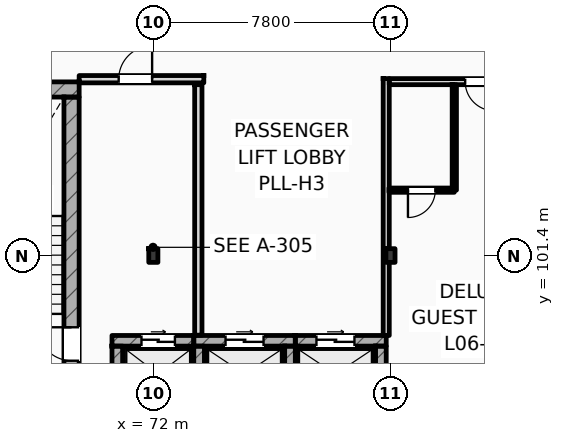
"""IFC4 building model, lengths in metres.
Left out: names, types, materials, properties, quantities, classifications, styles, units other than length and angle.
Written with IfcOpenShell. Run it as: python <this file> out.ifc"""

import sys

from ifc_helpers import new_model, si_unit, direction, frame, frame_2d, origin, origin_2d, place, context, subcontext, project, spatial, rectangle, i_section, extrude, element, fill, save


model = new_model("IFC4")
c1 = context("Model", 3, precision=1e-05, world=origin(), true_north=direction((0.0, 1.0)))
c2 = subcontext(c1, "Body", "Model", "MODEL_VIEW")
j1 = project(units=[si_unit("LENGTHUNIT", "METRE"), si_unit("PLANEANGLEUNIT", "RADIAN")], contexts=[c1])
p1 = place(None, origin())
s1 = spatial("IfcSite", under=j1, at=p1, CompositionType="ELEMENT")
p2 = place(p1, origin())
s2 = spatial("IfcBuilding", under=s1, at=p2, CompositionType="ELEMENT")
p3 = place(p2, frame((0.0, 0.0, 28.2)))
s3 = spatial("IfcBuildingStorey", under=s2, at=p3, CompositionType="ELEMENT", Elevation=28.2)
for number, where, z_axis, x_axis in (
    (1, (72.0, 101.4, 0.0), (0.0, 0.0, 1.0), (1.0, 0.0, 0.0)),
    (2, (79.8, 101.4, 0.0), (0.0, 0.0, 1.0), (1.0, 0.0, 0.0)),
):
    element("IfcColumn", number, at=place(p3, frame(where, z_axis=z_axis, x_axis=x_axis)), inside=s3, PredefinedType="COLUMN", context=c2, shape_type="SweptSolid", body=[
        extrude(i_section(OverallWidth=0.3, OverallDepth=0.45, WebThickness=0.014, FlangeThickness=0.026, FilletRadius=0.027, at=origin_2d()), origin(), (0.0, 0.0, 1.0), 3.6),
    ])
p4 = place(p3, frame((64.4, 106.862, 0.0), z_axis=(0.0, 0.0, 1.0), x_axis=(1.0, 0.0, 0.0)))
e3 = element("IfcWall", 3, at=p4, inside=s3, PredefinedType="SHEAR", context=c2, shape_type="SweptSolid", body=[
    extrude(rectangle(XDim=5.16, YDim=0.5, at=frame_2d((2.58, 0.0))), origin(), (0.0, 0.0, 1.0), 3.6),
])
p5 = place(p3, frame((69.31, 97.5, 0.0), z_axis=(0.0, 0.0, 1.0), x_axis=(0.0, 1.0, 0.0)))
e4 = element("IfcWall", 4, at=p5, inside=s3, PredefinedType="SHEAR", context=c2, shape_type="SweptSolid", body=[
    extrude(rectangle(XDim=9.112, YDim=0.5, at=frame_2d((4.556, 0.0))), origin(), (0.0, 0.0, 1.0), 3.6),
])
p6 = place(p5, frame((0.44, 0.0, 0.0)))
e5 = element("IfcOpeningElement", 5, at=p6, cuts=e4, PredefinedType="OPENING", context=c2, shape_type="SweptSolid", body=[
    extrude(rectangle(XDim=1.1, YDim=2.2, at=frame_2d((0.55, 1.1))), frame((0.0, 0.26, 0.0), z_axis=(0.0, -1.0, 0.0), x_axis=(1.0, 0.0, 0.0)), (0.0, 0.0, 1.0), 0.52),
])
p7 = place(p3, frame((70.64, 98.595, 0.0), z_axis=(0.0, 0.0, 1.0), x_axis=(1.0, 0.0, 0.0)))
e6 = element("IfcWall", 6, at=p7, inside=s3, PredefinedType="SHEAR", context=c2, shape_type="SweptSolid", body=[
    extrude(rectangle(XDim=2.69, YDim=0.35, at=frame_2d((1.345, 0.0))), origin(), (0.0, 0.0, 1.0), 3.36),
])
p8 = place(p7, frame((0.97, 0.0, 0.0)))
e7 = element("IfcOpeningElement", 7, at=p8, cuts=e6, PredefinedType="OPENING", context=c2, shape_type="SweptSolid", body=[
    extrude(rectangle(XDim=1.1, YDim=2.2, at=frame_2d((0.55, 1.1))), frame((0.0, 0.185, 0.0), z_axis=(0.0, -1.0, 0.0), x_axis=(1.0, 0.0, 0.0)), (0.0, 0.0, 1.0), 0.37),
])
p9 = place(p3, frame((70.815, 96.58, 0.0), z_axis=(0.0, 0.0, 1.0), x_axis=(0.0, 1.0, 0.0)))
e8 = element("IfcWall", 8, at=p9, inside=s3, PredefinedType="SHEAR", context=c2, shape_type="SweptSolid", body=[
    extrude(rectangle(XDim=1.84, YDim=0.35, at=frame_2d((0.92, 0.0))), origin(), (0.0, 0.0, 1.0), 3.36),
])
p10 = place(p3, frame((73.33, 98.595, 0.0), z_axis=(0.0, 0.0, 1.0), x_axis=(1.0, 0.0, 0.0)))
e9 = element("IfcWall", 9, at=p10, inside=s3, PredefinedType="SHEAR", context=c2, shape_type="SweptSolid", body=[
    extrude(rectangle(XDim=3.34, YDim=0.35, at=frame_2d((1.67, 0.0))), origin(), (0.0, 0.0, 1.0), 3.36),
])
p11 = place(p10, frame((1.045, 0.0, 0.0)))
e10 = element("IfcOpeningElement", 10, at=p11, cuts=e9, PredefinedType="OPENING", context=c2, shape_type="SweptSolid", body=[
    extrude(rectangle(XDim=1.25, YDim=2.25, at=frame_2d((0.625, 1.125))), frame((0.0, 0.185, 0.0), z_axis=(0.0, -1.0, 0.0), x_axis=(1.0, 0.0, 0.0)), (0.0, 0.0, 1.0), 0.37),
])
for number, where, z_axis, x_axis in (
    (11, (73.505, 96.58, 0.0), (0.0, 0.0, 1.0), (0.0, 1.0, 0.0)),
    (12, (76.495, 96.58, 0.0), (0.0, 0.0, 1.0), (0.0, 1.0, 0.0)),
):
    element("IfcWall", number, at=place(p3, frame(where, z_axis=z_axis, x_axis=x_axis)), inside=s3, PredefinedType="SHEAR", context=c2, shape_type="SweptSolid", body=[
        extrude(rectangle(XDim=1.84, YDim=0.35, at=frame_2d((0.92, 0.0))), origin(), (0.0, 0.0, 1.0), 3.36),
    ])
p12 = place(p3, frame((76.67, 98.595, 0.0), z_axis=(0.0, 0.0, 1.0), x_axis=(1.0, 0.0, 0.0)))
e13 = element("IfcWall", 13, at=p12, inside=s3, PredefinedType="SHEAR", context=c2, shape_type="SweptSolid", body=[
    extrude(rectangle(XDim=2.99, YDim=0.35, at=frame_2d((1.495, 0.0))), origin(), (0.0, 0.0, 1.0), 3.36),
])
p13 = place(p12, frame((0.695, 0.0, 0.0)))
e14 = element("IfcOpeningElement", 14, at=p13, cuts=e13, PredefinedType="OPENING", context=c2, shape_type="SweptSolid", body=[
    extrude(rectangle(XDim=1.25, YDim=2.25, at=frame_2d((0.625, 1.125))), frame((0.0, 0.185, 0.0), z_axis=(0.0, -1.0, 0.0), x_axis=(1.0, 0.0, 0.0)), (0.0, 0.0, 1.0), 0.37),
])
p14 = place(p3, frame((79.485, 96.58, 0.0), z_axis=(0.0, 0.0, 1.0), x_axis=(0.0, 1.0, 0.0)))
e15 = element("IfcWall", 15, at=p14, inside=s3, PredefinedType="SHEAR", context=c2, shape_type="SweptSolid", body=[
    extrude(rectangle(XDim=1.84, YDim=0.35, at=frame_2d((0.92, 0.0))), origin(), (0.0, 0.0, 1.0), 2.99),
])
p15 = place(p3, frame((73.48, 98.78, 0.0), z_axis=(0.0, 0.0, 1.0), x_axis=(0.0, 1.0, 0.0)))
e16 = element("IfcWall", 16, at=p15, inside=s3, PredefinedType="STANDARD", context=c2, shape_type="SweptSolid", body=[
    extrude(rectangle(XDim=8.24, YDim=0.24, at=frame_2d((4.12, 0.0))), origin(), (0.0, 0.0, 1.0), 3.36),
])
p16 = place(p3, frame((69.56, 107.2, 0.0), z_axis=(0.0, 0.0, 1.0), x_axis=(1.0, 0.0, 0.0)))
e17 = element("IfcWall", 17, at=p16, inside=s3, PredefinedType="STANDARD", context=c2, shape_type="SweptSolid", body=[
    extrude(rectangle(XDim=4.1, YDim=0.24, at=frame_2d((2.05, 0.0))), origin(), (0.0, 0.0, 1.0), 3.36),
])
p17 = place(p16, frame((1.3, 0.0, 0.0)))
e18 = element("IfcOpeningElement", 18, at=p17, cuts=e17, PredefinedType="OPENING", context=c2, shape_type="SweptSolid", body=[
    extrude(rectangle(XDim=1.1, YDim=2.2, at=frame_2d((0.55, 1.1))), frame((0.0, 0.13, 0.0), z_axis=(0.0, -1.0, 0.0), x_axis=(1.0, 0.0, 0.0)), (0.0, 0.0, 1.0), 0.26),
])
p18 = place(p3, frame((79.76, 107.12, 0.0), z_axis=(0.0, 0.0, 1.0), x_axis=(1.0, 0.0, 0.0)))
e19 = element("IfcWall", 19, at=p18, inside=s3, PredefinedType="PARTITIONING", context=c2, shape_type="SweptSolid", body=[
    extrude(rectangle(XDim=40.1, YDim=0.2, at=frame_2d((20.05, 0.0))), origin(), (0.0, 0.0, 1.0), 3.36),
])
p19 = place(p18, frame((2.497, 0.0, 0.0)))
e20 = element("IfcOpeningElement", 20, at=p19, cuts=e19, PredefinedType="OPENING", context=c2, shape_type="SweptSolid", body=[
    extrude(rectangle(XDim=0.96, YDim=2.2, at=frame_2d((0.48, 1.1))), frame((0.0, 0.11, 0.0), z_axis=(0.0, -1.0, 0.0), x_axis=(1.0, 0.0, 0.0)), (0.0, 0.0, 1.0), 0.22),
])
p20 = place(p18, frame((4.372, 0.0, 0.0)))
e21 = element("IfcOpeningElement", 21, at=p20, cuts=e19, PredefinedType="OPENING", context=c2, shape_type="SweptSolid", body=[
    extrude(rectangle(XDim=0.96, YDim=2.2, at=frame_2d((0.48, 1.1))), frame((0.0, 0.11, 0.0), z_axis=(0.0, -1.0, 0.0), x_axis=(1.0, 0.0, 0.0)), (0.0, 0.0, 1.0), 0.22),
])
p21 = place(p18, frame((10.507, 0.0, 0.0)))
e22 = element("IfcOpeningElement", 22, at=p21, cuts=e19, PredefinedType="OPENING", context=c2, shape_type="SweptSolid", body=[
    extrude(rectangle(XDim=0.96, YDim=2.2, at=frame_2d((0.48, 1.1))), frame((0.0, 0.11, 0.0), z_axis=(0.0, -1.0, 0.0), x_axis=(1.0, 0.0, 0.0)), (0.0, 0.0, 1.0), 0.22),
])
p22 = place(p18, frame((12.342, 0.0, 0.0)))
e23 = element("IfcOpeningElement", 23, at=p22, cuts=e19, PredefinedType="OPENING", context=c2, shape_type="SweptSolid", body=[
    extrude(rectangle(XDim=0.96, YDim=2.2, at=frame_2d((0.48, 1.1))), frame((0.0, 0.11, 0.0), z_axis=(0.0, -1.0, 0.0), x_axis=(1.0, 0.0, 0.0)), (0.0, 0.0, 1.0), 0.22),
])
p23 = place(p18, frame((18.477, 0.0, 0.0)))
e24 = element("IfcOpeningElement", 24, at=p23, cuts=e19, PredefinedType="OPENING", context=c2, shape_type="SweptSolid", body=[
    extrude(rectangle(XDim=0.96, YDim=2.2, at=frame_2d((0.48, 1.1))), frame((0.0, 0.11, 0.0), z_axis=(0.0, -1.0, 0.0), x_axis=(1.0, 0.0, 0.0)), (0.0, 0.0, 1.0), 0.22),
])
p24 = place(p18, frame((20.312, 0.0, 0.0)))
e25 = element("IfcOpeningElement", 25, at=p24, cuts=e19, PredefinedType="OPENING", context=c2, shape_type="SweptSolid", body=[
    extrude(rectangle(XDim=0.96, YDim=2.2, at=frame_2d((0.48, 1.1))), frame((0.0, 0.11, 0.0), z_axis=(0.0, -1.0, 0.0), x_axis=(1.0, 0.0, 0.0)), (0.0, 0.0, 1.0), 0.22),
])
p25 = place(p18, frame((26.447, 0.0, 0.0)))
e26 = element("IfcOpeningElement", 26, at=p25, cuts=e19, PredefinedType="OPENING", context=c2, shape_type="SweptSolid", body=[
    extrude(rectangle(XDim=0.96, YDim=2.2, at=frame_2d((0.48, 1.1))), frame((0.0, 0.11, 0.0), z_axis=(0.0, -1.0, 0.0), x_axis=(1.0, 0.0, 0.0)), (0.0, 0.0, 1.0), 0.22),
])
p26 = place(p18, frame((28.282, 0.0, 0.0)))
e27 = element("IfcOpeningElement", 27, at=p26, cuts=e19, PredefinedType="OPENING", context=c2, shape_type="SweptSolid", body=[
    extrude(rectangle(XDim=0.96, YDim=2.2, at=frame_2d((0.48, 1.1))), frame((0.0, 0.11, 0.0), z_axis=(0.0, -1.0, 0.0), x_axis=(1.0, 0.0, 0.0)), (0.0, 0.0, 1.0), 0.22),
])
p27 = place(p18, frame((34.417, 0.0, 0.0)))
e28 = element("IfcOpeningElement", 28, at=p27, cuts=e19, PredefinedType="OPENING", context=c2, shape_type="SweptSolid", body=[
    extrude(rectangle(XDim=0.96, YDim=2.2, at=frame_2d((0.48, 1.1))), frame((0.0, 0.11, 0.0), z_axis=(0.0, -1.0, 0.0), x_axis=(1.0, 0.0, 0.0)), (0.0, 0.0, 1.0), 0.22),
])
p28 = place(p18, frame((36.212, 0.0, 0.0)))
e29 = element("IfcOpeningElement", 29, at=p28, cuts=e19, PredefinedType="OPENING", context=c2, shape_type="SweptSolid", body=[
    extrude(rectangle(XDim=0.96, YDim=2.2, at=frame_2d((0.48, 1.1))), frame((0.0, 0.11, 0.0), z_axis=(0.0, -1.0, 0.0), x_axis=(1.0, 0.0, 0.0)), (0.0, 0.0, 1.0), 0.22),
])
p29 = place(p3, frame((79.66, 98.77, 0.0), z_axis=(0.0, 0.0, 1.0), x_axis=(0.0, 1.0, 0.0)))
e30 = element("IfcWall", 30, at=p29, inside=s3, PredefinedType="PARTITIONING", context=c2, shape_type="SweptSolid", body=[
    extrude(rectangle(XDim=8.45, YDim=0.2, at=frame_2d((4.225, 0.0))), origin(), (0.0, 0.0, 1.0), 2.99),
])
p30 = place(p3, frame((81.9, 103.55, 0.0), z_axis=(0.0, 0.0, 1.0), x_axis=(0.0, 1.0, 0.0)))
e31 = element("IfcWall", 31, at=p30, inside=s3, PredefinedType="PARTITIONING", context=c2, shape_type="SweptSolid", body=[
    extrude(rectangle(XDim=3.47, YDim=0.14, at=frame_2d((1.735, 0.0))), origin(), (0.0, 0.0, 1.0), 3.36),
])
p31 = place(p3, frame((79.75, 103.55, 0.0), z_axis=(0.0, 0.0, 1.0), x_axis=(1.0, 0.0, 0.0)))
e32 = element("IfcWall", 32, at=p31, inside=s3, PredefinedType="PARTITIONING", context=c2, shape_type="SweptSolid", body=[
    extrude(rectangle(XDim=2.15, YDim=0.14, at=frame_2d((1.075, 0.0))), origin(), (0.0, 0.0, 1.0), 3.36),
])
p32 = place(p31, frame((0.625, 0.0, 0.0)))
e33 = element("IfcOpeningElement", 33, at=p32, cuts=e32, PredefinedType="OPENING", context=c2, shape_type="SweptSolid", body=[
    extrude(rectangle(XDim=0.9, YDim=2.1, at=frame_2d((0.45, 1.05))), frame((0.0, 0.08, 0.0), z_axis=(0.0, -1.0, 0.0), x_axis=(1.0, 0.0, 0.0)), (0.0, 0.0, 1.0), 0.16),
])
p33 = place(p6, origin())
e34 = element("IfcDoor", 34, at=p33, inside=s3, OperationType="SINGLE_SWING_RIGHT", PredefinedType="DOOR", context=c2, shape_type="SweptSolid", body=[
    extrude(rectangle(XDim=1.1, YDim=2.2, at=frame_2d((0.55, 1.1))), frame((0.0, 0.025, 0.0), z_axis=(0.0, -1.0, 0.0), x_axis=(1.0, 0.0, 0.0)), (0.0, 0.0, 1.0), 0.05),
])
fill(e5, e34)
p34 = place(p8, origin())
e35 = element("IfcDoor", 35, at=p34, inside=s3, OperationType="SLIDING_TO_LEFT", PredefinedType="DOOR", context=c2, shape_type="SweptSolid", body=[
    extrude(rectangle(XDim=1.1, YDim=2.2, at=frame_2d((0.55, 1.1))), frame((0.0, 0.025, 0.0), z_axis=(0.0, -1.0, 0.0), x_axis=(1.0, 0.0, 0.0)), (0.0, 0.0, 1.0), 0.05),
])
fill(e7, e35)
p35 = place(p11, origin())
e36 = element("IfcDoor", 36, at=p35, inside=s3, OperationType="SLIDING_TO_LEFT", PredefinedType="DOOR", context=c2, shape_type="SweptSolid", body=[
    extrude(rectangle(XDim=1.25, YDim=2.25, at=frame_2d((0.625, 1.125))), frame((0.0, 0.025, 0.0), z_axis=(0.0, -1.0, 0.0), x_axis=(1.0, 0.0, 0.0)), (0.0, 0.0, 1.0), 0.05),
])
fill(e10, e36)
p36 = place(p13, origin())
e37 = element("IfcDoor", 37, at=p36, inside=s3, OperationType="SLIDING_TO_LEFT", PredefinedType="DOOR", context=c2, shape_type="SweptSolid", body=[
    extrude(rectangle(XDim=1.25, YDim=2.25, at=frame_2d((0.625, 1.125))), frame((0.0, 0.025, 0.0), z_axis=(0.0, -1.0, 0.0), x_axis=(1.0, 0.0, 0.0)), (0.0, 0.0, 1.0), 0.05),
])
fill(e14, e37)
p37 = place(p17, origin())
e38 = element("IfcDoor", 38, at=p37, inside=s3, OperationType="SINGLE_SWING_RIGHT", PredefinedType="DOOR", context=c2, shape_type="SweptSolid", body=[
    extrude(rectangle(XDim=1.1, YDim=2.2, at=frame_2d((0.55, 1.1))), frame((0.0, 0.025, 0.0), z_axis=(0.0, -1.0, 0.0), x_axis=(1.0, 0.0, 0.0)), (0.0, 0.0, 1.0), 0.05),
])
fill(e18, e38)
p38 = place(p19, frame((0.96, 0.0, 0.0), z_axis=(0.0, 0.0, 1.0), x_axis=(-1.0, 0.0, 0.0)))
e39 = element("IfcDoor", 39, at=p38, inside=s3, OperationType="SINGLE_SWING_RIGHT", PredefinedType="DOOR", context=c2, shape_type="SweptSolid", body=[
    extrude(rectangle(XDim=0.96, YDim=2.2, at=frame_2d((0.48, 1.1))), frame((0.0, 0.025, 0.0), z_axis=(0.0, -1.0, 0.0), x_axis=(1.0, 0.0, 0.0)), (0.0, 0.0, 1.0), 0.05),
])
fill(e20, e39)
p39 = place(p32, frame((0.9, 0.0, 0.0), z_axis=(0.0, 0.0, 1.0), x_axis=(-1.0, 0.0, 0.0)))
e40 = element("IfcDoor", 40, at=p39, inside=s3, OperationType="SINGLE_SWING_LEFT", PredefinedType="DOOR", context=c2, shape_type="SweptSolid", body=[
    extrude(rectangle(XDim=0.9, YDim=2.1, at=frame_2d((0.45, 1.05))), frame((0.0, 0.025, 0.0), z_axis=(0.0, -1.0, 0.0), x_axis=(1.0, 0.0, 0.0)), (0.0, 0.0, 1.0), 0.05),
])
fill(e33, e40)
save(model, sys.argv[1])
